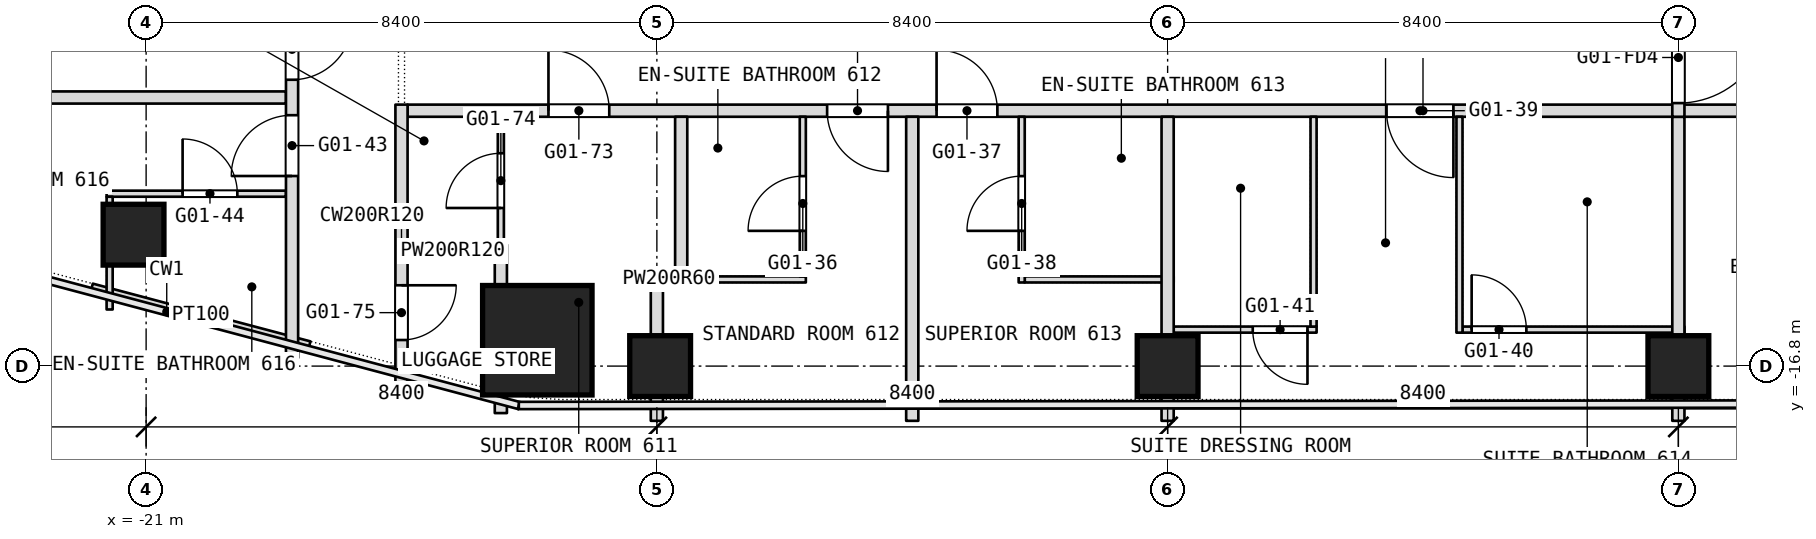
"""IFC4 building model, lengths in metres.
Left out: names, types, materials, properties, quantities, classifications, styles, units other than length and angle.
Written with IfcOpenShell. Run it as: python <this file> out.ifc"""

import sys

from ifc_helpers import new_model, si_unit, direction, frame, frame_2d, origin, origin_2d, place, context, subcontext, project, spatial, rectangle, extrude, element, fill, save


model = new_model("IFC4")
c1 = context("Model", 3, precision=1e-05, world=origin(), true_north=direction((0.0, 1.0)))
c2 = subcontext(c1, "Body", "Model", "MODEL_VIEW")
j1 = project(units=[si_unit("LENGTHUNIT", "METRE"), si_unit("PLANEANGLEUNIT", "RADIAN")], contexts=[c1])
p1 = place(None, origin())
s1 = spatial("IfcSite", under=j1, at=p1, CompositionType="ELEMENT")
p2 = place(p1, origin())
s2 = spatial("IfcBuilding", under=s1, at=p2, CompositionType="ELEMENT")
p3 = place(p2, frame((0.0, 0.0, 36.5)))
s3 = spatial("IfcBuildingStorey", under=s2, at=p3, CompositionType="ELEMENT", Elevation=36.5)
p4 = place(p3, frame((-14.566, -16.375, 0.0), z_axis=(0.0, 0.0, 1.0), x_axis=(1.0, 0.0, 0.0)))
e1 = element("IfcColumn", 1, at=p4, inside=s3, PredefinedType="COLUMN", context=c2, shape_type="SweptSolid", body=[
    extrude(rectangle(XDim=1.8, YDim=1.8, at=origin_2d()), origin(), (0.0, 0.0, 1.0), 3.6),
])
p5 = place(p3, frame((-21.207, -14.639, -0.15), z_axis=(0.0, 0.0, 1.0), x_axis=(1.0, 0.0, 0.0)))
e2 = element("IfcColumn", 2, at=p5, inside=s3, PredefinedType="COLUMN", context=c2, shape_type="SweptSolid", body=[
    extrude(rectangle(XDim=1.0, YDim=1.0, at=origin_2d()), origin(), (0.0, 0.0, 1.0), 3.75),
])
p6 = place(p3, frame((-21.89, -15.492, 0.0), z_axis=(0.0, 0.0, 1.0), x_axis=(0.966548219163, -0.256484970385, 0.0)))
e3 = element("IfcWall", 3, at=p6, inside=s3, PredefinedType="PARTITIONING", context=c2, shape_type="SweptSolid", body=[
    extrude(rectangle(XDim=3.704, YDim=0.1, at=frame_2d((1.852, 0.0))), origin(), (0.0, 0.0, 1.0), 3.34),
])
p7 = place(p3, frame((-4.1, -16.2, 0.0), z_axis=(0.0, 0.0, 1.0), x_axis=(1.0, 0.0, 0.0)))
e4 = element("IfcWall", 4, at=p7, inside=s3, PredefinedType="PARTITIONING", context=c2, shape_type="SweptSolid", body=[
    extrude(rectangle(XDim=2.35, YDim=0.1, at=frame_2d((1.175, 0.0))), origin(), (0.0, 0.0, 1.0), 2.94),
])
p8 = place(p7, frame((1.3, 0.0, 0.0)))
e5 = element("IfcOpeningElement", 5, at=p8, cuts=e4, PredefinedType="OPENING", context=c2, shape_type="SweptSolid", body=[
    extrude(rectangle(XDim=0.9, YDim=2.1, at=frame_2d((0.45, 1.05))), frame((0.0, 0.05, 0.0), z_axis=(0.0, -1.0, 0.0), x_axis=(1.0, 0.0, 0.0)), (0.0, 0.0, 1.0), 0.1),
])
p9 = place(p3, frame((0.65, -16.2, 0.0), z_axis=(0.0, 0.0, 1.0), x_axis=(1.0, 0.0, 0.0)))
e6 = element("IfcWall", 6, at=p9, inside=s3, PredefinedType="PARTITIONING", context=c2, shape_type="SweptSolid", body=[
    extrude(rectangle(XDim=3.65, YDim=0.1, at=frame_2d((1.825, 0.0))), origin(), (0.0, 0.0, 1.0), 2.94),
])
p10 = place(p9, frame((0.15, 0.0, 0.0)))
e7 = element("IfcOpeningElement", 7, at=p10, cuts=e6, PredefinedType="OPENING", context=c2, shape_type="SweptSolid", body=[
    extrude(rectangle(XDim=0.9, YDim=2.1, at=frame_2d((0.45, 1.05))), frame((0.0, 0.05, 0.0), z_axis=(0.0, -1.0, 0.0), x_axis=(1.0, 0.0, 0.0)), (0.0, 0.0, 1.0), 0.1),
])
p11 = place(p3, frame((-12.7, -15.375, 0.0), z_axis=(0.0, 0.0, 1.0), x_axis=(1.0, 0.0, 0.0)))
e8 = element("IfcWall", 8, at=p11, inside=s3, PredefinedType="PARTITIONING", context=c2, shape_type="SweptSolid", body=[
    extrude(rectangle(XDim=0.6, YDim=0.2, at=frame_2d((0.3, 0.0))), origin(), (0.0, 0.0, 1.0), 3.34),
])
p12 = place(p3, frame((-12.1, -15.375, 0.0), z_axis=(0.0, 0.0, 1.0), x_axis=(1.0, 0.0, 0.0)))
e9 = element("IfcWall", 9, at=p12, inside=s3, PredefinedType="PARTITIONING", context=c2, shape_type="SweptSolid", body=[
    extrude(rectangle(XDim=1.95, YDim=0.1, at=frame_2d((0.975, 0.0))), origin(), (0.0, 0.0, 1.0), 3.34),
])
p13 = place(p3, frame((-6.55, -15.375, 0.0), z_axis=(0.0, 0.0, 1.0), x_axis=(1.0, 0.0, 0.0)))
e10 = element("IfcWall", 10, at=p13, inside=s3, PredefinedType="PARTITIONING", context=c2, shape_type="SweptSolid", body=[
    extrude(rectangle(XDim=2.45, YDim=0.1, at=frame_2d((1.225, 0.0))), origin(), (0.0, 0.0, 1.0), 3.34),
])
p14 = place(p3, frame((-16.7, -14.9, 0.0), z_axis=(0.0, 0.0, 1.0), x_axis=(1.0, 0.0, 0.0)))
e11 = element("IfcWall", 11, at=p14, inside=s3, PredefinedType="PARTITIONING", context=c2, shape_type="SweptSolid", body=[
    extrude(rectangle(XDim=1.484, YDim=0.2, at=frame_2d((0.742, 0.0))), origin(), (0.0, 0.0, 1.0), 3.34),
])
p15 = place(p3, frame((-21.65, -13.965, 0.0), z_axis=(0.0, 0.0, 1.0), x_axis=(1.0, 0.0, 0.0)))
e12 = element("IfcWall", 12, at=p15, inside=s3, PredefinedType="PARTITIONING", context=c2, shape_type="SweptSolid", body=[
    extrude(rectangle(XDim=2.95, YDim=0.1, at=frame_2d((1.475, 0.0))), origin(), (0.0, 0.0, 1.0), 3.34),
])
p16 = place(p15, frame((1.25, 0.0, 0.0)))
e13 = element("IfcOpeningElement", 13, at=p16, cuts=e12, PredefinedType="OPENING", context=c2, shape_type="SweptSolid", body=[
    extrude(rectangle(XDim=0.9, YDim=2.1, at=frame_2d((0.45, 1.05))), frame((0.0, 0.05, 0.0), z_axis=(0.0, -1.0, 0.0), x_axis=(1.0, 0.0, 0.0)), (0.0, 0.0, 1.0), 0.1),
])
p17 = place(p3, frame((-16.7, -12.6, 0.0), z_axis=(0.0, 0.0, 1.0), x_axis=(1.0, 0.0, 0.0)))
e14 = element("IfcWall", 14, at=p17, inside=s3, PredefinedType="PARTITIONING", context=c2, shape_type="SweptSolid", body=[
    extrude(rectangle(XDim=33.4, YDim=0.2, at=frame_2d((16.7, 0.0))), origin(), (0.0, 0.0, 1.0), 3.34),
])
p18 = place(p17, frame((6.9, 0.0, 0.0)))
e15 = element("IfcOpeningElement", 15, at=p18, cuts=e14, PredefinedType="OPENING", context=c2, shape_type="SweptSolid", body=[
    extrude(rectangle(XDim=1.0, YDim=2.1, at=frame_2d((0.5, 1.05))), frame((0.0, 0.1, 0.0), z_axis=(0.0, -1.0, 0.0), x_axis=(1.0, 0.0, 0.0)), (0.0, 0.0, 1.0), 0.2),
])
p19 = place(p17, frame((8.7, 0.0, 0.0)))
e16 = element("IfcOpeningElement", 16, at=p19, cuts=e14, PredefinedType="OPENING", context=c2, shape_type="SweptSolid", body=[
    extrude(rectangle(XDim=1.0, YDim=2.1, at=frame_2d((0.5, 1.05))), frame((0.0, 0.1, 0.0), z_axis=(0.0, -1.0, 0.0), x_axis=(1.0, 0.0, 0.0)), (0.0, 0.0, 1.0), 0.2),
])
p20 = place(p17, frame((16.1, 0.0, 0.0)))
e17 = element("IfcOpeningElement", 17, at=p20, cuts=e14, PredefinedType="OPENING", context=c2, shape_type="SweptSolid", body=[
    extrude(rectangle(XDim=1.1, YDim=2.1, at=frame_2d((0.55, 1.05))), frame((0.0, 0.1, 0.0), z_axis=(0.0, -1.0, 0.0), x_axis=(1.0, 0.0, 0.0)), (0.0, 0.0, 1.0), 0.2),
])
p21 = place(p17, frame((24.2, 0.0, 0.0)))
e18 = element("IfcOpeningElement", 18, at=p21, cuts=e14, PredefinedType="OPENING", context=c2, shape_type="SweptSolid", body=[
    extrude(rectangle(XDim=1.8, YDim=2.1, at=frame_2d((0.9, 1.05))), frame((0.0, 0.1, 0.0), z_axis=(0.0, -1.0, 0.0), x_axis=(1.0, 0.0, 0.0)), (0.0, 0.0, 1.0), 0.2),
])
p22 = place(p17, frame((2.317, 0.0, 0.0)))
e19 = element("IfcOpeningElement", 19, at=p22, cuts=e14, PredefinedType="OPENING", context=c2, shape_type="SweptSolid", body=[
    extrude(rectangle(XDim=1.0, YDim=2.1, at=frame_2d((0.5, 1.05))), frame((0.0, 0.1, 0.0), z_axis=(0.0, -1.0, 0.0), x_axis=(1.0, 0.0, 0.0)), (0.0, 0.0, 1.0), 0.2),
])
p23 = place(p17, frame((30.033, 0.0, 0.0)))
e20 = element("IfcOpeningElement", 20, at=p23, cuts=e14, PredefinedType="OPENING", context=c2, shape_type="SweptSolid", body=[
    extrude(rectangle(XDim=1.0, YDim=2.1, at=frame_2d((0.5, 1.05))), frame((0.0, 0.1, 0.0), z_axis=(0.0, -1.0, 0.0), x_axis=(1.0, 0.0, 0.0)), (0.0, 0.0, 1.0), 0.2),
])
p24 = place(p3, frame((-26.463, -12.383, 0.0), z_axis=(0.0, 0.0, 1.0), x_axis=(1.0, 0.0, 0.0)))
e21 = element("IfcWall", 21, at=p24, inside=s3, PredefinedType="PARTITIONING", context=c2, shape_type="SweptSolid", body=[
    extrude(rectangle(XDim=7.763, YDim=0.2, at=frame_2d((3.881, 0.0))), origin(), (0.0, 0.0, 1.0), 3.34),
])
p25 = place(p3, frame((4.2, -17.7, 0.0), z_axis=(0.0, 0.0, 1.0), x_axis=(0.0, 1.0, 0.0)))
e22 = element("IfcWall", 22, at=p25, inside=s3, PredefinedType="PARTITIONING", context=c2, shape_type="SweptSolid", body=[
    extrude(rectangle(XDim=5.0, YDim=0.2, at=frame_2d((2.5, 0.0))), origin(), (0.0, 0.0, 1.0), 3.34),
])
p26 = place(p3, frame((4.2, -12.7, 0.0), z_axis=(0.0, 0.0, 1.0), x_axis=(0.0, 1.0, 0.0)))
e23 = element("IfcWall", 23, at=p26, inside=s3, PredefinedType="PARTITIONING", context=c2, shape_type="SweptSolid", body=[
    extrude(rectangle(XDim=12.7, YDim=0.2, at=frame_2d((6.35, 0.0))), origin(), (0.0, 0.0, 1.0), 3.34),
])
p27 = place(p26, frame((11.05, 0.0, 0.0)))
e24 = element("IfcOpeningElement", 24, at=p27, cuts=e23, PredefinedType="OPENING", context=c2, shape_type="SweptSolid", body=[
    extrude(rectangle(XDim=1.5, YDim=2.1, at=frame_2d((0.75, 1.05))), frame((0.0, 0.1, 0.0), z_axis=(0.0, -1.0, 0.0), x_axis=(1.0, 0.0, 0.0)), (0.0, 0.0, 1.0), 0.2),
])
p28 = place(p26, frame((0.225, 0.0, 0.0)))
e25 = element("IfcOpeningElement", 25, at=p28, cuts=e23, PredefinedType="OPENING", context=c2, shape_type="SweptSolid", body=[
    extrude(rectangle(XDim=1.5, YDim=2.1, at=frame_2d((0.75, 1.05))), frame((0.0, 0.1, 0.0), z_axis=(0.0, -1.0, 0.0), x_axis=(1.0, 0.0, 0.0)), (0.0, 0.0, 1.0), 0.2),
])
p29 = place(p3, frame((0.6, -16.25, 0.0), z_axis=(0.0, 0.0, 1.0), x_axis=(0.0, 1.0, 0.0)))
e26 = element("IfcWall", 26, at=p29, inside=s3, PredefinedType="PARTITIONING", context=c2, shape_type="SweptSolid", body=[
    extrude(rectangle(XDim=3.55, YDim=0.1, at=frame_2d((1.775, 0.0))), origin(), (0.0, 0.0, 1.0), 3.34),
])
p30 = place(p3, frame((-1.8, -16.15, 0.0), z_axis=(0.0, 0.0, 1.0), x_axis=(0.0, 1.0, 0.0)))
e27 = element("IfcWall", 27, at=p30, inside=s3, PredefinedType="PARTITIONING", context=c2, shape_type="SweptSolid", body=[
    extrude(rectangle(XDim=3.45, YDim=0.1, at=frame_2d((1.725, 0.0))), origin(), (0.0, 0.0, 1.0), 3.34),
])
p31 = place(p3, frame((-4.2, -17.7, 0.0), z_axis=(0.0, 0.0, 1.0), x_axis=(0.0, 1.0, 0.0)))
e28 = element("IfcWall", 28, at=p31, inside=s3, PredefinedType="PARTITIONING", context=c2, shape_type="SweptSolid", body=[
    extrude(rectangle(XDim=5.0, YDim=0.2, at=frame_2d((2.5, 0.0))), origin(), (0.0, 0.0, 1.0), 3.34),
])
p32 = place(p3, frame((-6.6, -15.425, 0.0), z_axis=(0.0, 0.0, 1.0), x_axis=(0.0, 1.0, 0.0)))
e29 = element("IfcWall", 29, at=p32, inside=s3, PredefinedType="PARTITIONING", context=c2, shape_type="SweptSolid", body=[
    extrude(rectangle(XDim=2.725, YDim=0.1, at=frame_2d((1.363, 0.0))), origin(), (0.0, 0.0, 1.0), 3.34),
])
p33 = place(p32, frame((0.849, 0.0, 0.0)))
e30 = element("IfcOpeningElement", 30, at=p33, cuts=e29, PredefinedType="OPENING", context=c2, shape_type="SweptSolid", body=[
    extrude(rectangle(XDim=0.9, YDim=2.1, at=frame_2d((0.45, 1.05))), frame((0.0, 0.05, 0.0), z_axis=(0.0, -1.0, 0.0), x_axis=(1.0, 0.0, 0.0)), (0.0, 0.0, 1.0), 0.1),
])
p34 = place(p3, frame((-8.4, -17.7, 0.0), z_axis=(0.0, 0.0, 1.0), x_axis=(0.0, 1.0, 0.0)))
e31 = element("IfcWall", 31, at=p34, inside=s3, PredefinedType="PARTITIONING", context=c2, shape_type="SweptSolid", body=[
    extrude(rectangle(XDim=5.0, YDim=0.2, at=frame_2d((2.5, 0.0))), origin(), (0.0, 0.0, 1.0), 3.34),
])
p35 = place(p3, frame((-10.2, -15.325, 0.0), z_axis=(0.0, 0.0, 1.0), x_axis=(0.0, 1.0, 0.0)))
e32 = element("IfcWall", 32, at=p35, inside=s3, PredefinedType="PARTITIONING", context=c2, shape_type="SweptSolid", body=[
    extrude(rectangle(XDim=2.625, YDim=0.1, at=frame_2d((1.312, 0.0))), origin(), (0.0, 0.0, 1.0), 3.34),
])
p36 = place(p35, frame((0.749, 0.0, 0.0)))
e33 = element("IfcOpeningElement", 33, at=p36, cuts=e32, PredefinedType="OPENING", context=c2, shape_type="SweptSolid", body=[
    extrude(rectangle(XDim=0.9, YDim=2.1, at=frame_2d((0.45, 1.05))), frame((0.0, 0.05, 0.0), z_axis=(0.0, -1.0, 0.0), x_axis=(1.0, 0.0, 0.0)), (0.0, 0.0, 1.0), 0.1),
])
p37 = place(p3, frame((-12.2, -15.275, 0.0), z_axis=(0.0, 0.0, 1.0), x_axis=(0.0, 1.0, 0.0)))
e34 = element("IfcWall", 34, at=p37, inside=s3, PredefinedType="PARTITIONING", context=c2, shape_type="SweptSolid", body=[
    extrude(rectangle(XDim=2.575, YDim=0.2, at=frame_2d((1.288, 0.0))), origin(), (0.0, 0.0, 1.0), 3.34),
])
p38 = place(p3, frame((-12.6, -17.7, 0.0), z_axis=(0.0, 0.0, 1.0), x_axis=(0.0, 1.0, 0.0)))
e35 = element("IfcWall", 35, at=p38, inside=s3, PredefinedType="PARTITIONING", context=c2, shape_type="SweptSolid", body=[
    extrude(rectangle(XDim=2.225, YDim=0.2, at=frame_2d((1.112, 0.0))), origin(), (0.0, 0.0, 1.0), 3.34),
])
p39 = place(p3, frame((-15.166, -17.573, 0.0), z_axis=(0.0, 0.0, 1.0), x_axis=(0.0, 1.0, 0.0)))
e36 = element("IfcWall", 36, at=p39, inside=s3, PredefinedType="PARTITIONING", context=c2, shape_type="SweptSolid", body=[
    extrude(rectangle(XDim=0.298, YDim=0.2, at=frame_2d((0.149, 0.0))), origin(), (0.0, 0.0, 1.0), 3.34),
])
p40 = place(p3, frame((-15.166, -15.475, 0.0), z_axis=(0.0, 0.0, 1.0), x_axis=(0.0, 1.0, 0.0)))
e37 = element("IfcWall", 37, at=p40, inside=s3, PredefinedType="PARTITIONING", context=c2, shape_type="SweptSolid", body=[
    extrude(rectangle(XDim=0.675, YDim=0.2, at=frame_2d((0.337, 0.0))), origin(), (0.0, 0.0, 1.0), 3.34),
])
p41 = place(p3, frame((-15.166, -15.0, 0.0), z_axis=(0.0, 0.0, 1.0), x_axis=(0.0, 1.0, 0.0)))
e38 = element("IfcWall", 38, at=p41, inside=s3, PredefinedType="PARTITIONING", context=c2, shape_type="SweptSolid", body=[
    extrude(rectangle(XDim=2.3, YDim=0.1, at=frame_2d((1.15, 0.0))), origin(), (0.0, 0.0, 1.0), 3.34),
])
p42 = place(p41, frame((0.8, 0.0, 0.0)))
e39 = element("IfcOpeningElement", 39, at=p42, cuts=e38, PredefinedType="OPENING", context=c2, shape_type="SweptSolid", body=[
    extrude(rectangle(XDim=0.9, YDim=2.1, at=frame_2d((0.45, 1.05))), frame((0.0, 0.05, 0.0), z_axis=(0.0, -1.0, 0.0), x_axis=(1.0, 0.0, 0.0)), (0.0, 0.0, 1.0), 0.1),
])
p43 = place(p3, frame((-16.8, -17.143, 0.0), z_axis=(0.0, 0.0, 1.0), x_axis=(0.0, 1.0, 0.0)))
e40 = element("IfcWall", 40, at=p43, inside=s3, PredefinedType="PARTITIONING", context=c2, shape_type="SweptSolid", body=[
    extrude(rectangle(XDim=4.643, YDim=0.2, at=frame_2d((2.322, 0.0))), origin(), (0.0, 0.0, 1.0), 3.34),
])
p44 = place(p43, frame((0.772, 0.0, 0.0)))
e41 = element("IfcOpeningElement", 41, at=p44, cuts=e40, PredefinedType="OPENING", context=c2, shape_type="SweptSolid", body=[
    extrude(rectangle(XDim=0.9, YDim=2.1, at=frame_2d((0.45, 1.05))), frame((0.0, 0.1, 0.0), z_axis=(0.0, -1.0, 0.0), x_axis=(1.0, 0.0, 0.0)), (0.0, 0.0, 1.0), 0.2),
])
p45 = place(p3, frame((-18.6, -16.665, 0.0), z_axis=(0.0, 0.0, 1.0), x_axis=(0.0, 1.0, 0.0)))
e42 = element("IfcWall", 42, at=p45, inside=s3, PredefinedType="PARTITIONING", context=c2, shape_type="SweptSolid", body=[
    extrude(rectangle(XDim=23.565, YDim=0.2, at=frame_2d((11.782, 0.0))), origin(), (0.0, 0.0, 1.0), 3.34),
])
p46 = place(p45, frame((2.991, 0.0, 0.0)))
e43 = element("IfcOpeningElement", 43, at=p46, cuts=e42, PredefinedType="OPENING", context=c2, shape_type="SweptSolid", body=[
    extrude(rectangle(XDim=1.0, YDim=2.1, at=frame_2d((0.5, 1.05))), frame((0.0, 0.1, 0.0), z_axis=(0.0, -1.0, 0.0), x_axis=(1.0, 0.0, 0.0)), (0.0, 0.0, 1.0), 0.2),
])
p47 = place(p45, frame((4.574, 0.0, 0.0)))
e44 = element("IfcOpeningElement", 44, at=p47, cuts=e42, PredefinedType="OPENING", context=c2, shape_type="SweptSolid", body=[
    extrude(rectangle(XDim=1.0, YDim=2.1, at=frame_2d((0.5, 1.05))), frame((0.0, 0.1, 0.0), z_axis=(0.0, -1.0, 0.0), x_axis=(1.0, 0.0, 0.0)), (0.0, 0.0, 1.0), 0.2),
])
p48 = place(p45, frame((11.565, 0.0, 0.0)))
e45 = element("IfcOpeningElement", 45, at=p48, cuts=e42, PredefinedType="OPENING", context=c2, shape_type="SweptSolid", body=[
    extrude(rectangle(XDim=1.8, YDim=2.1, at=frame_2d((0.9, 1.05))), frame((0.0, 0.1, 0.0), z_axis=(0.0, -1.0, 0.0), x_axis=(1.0, 0.0, 0.0)), (0.0, 0.0, 1.0), 0.2),
])
p49 = place(p3, frame((-21.6, -15.869, 0.0), z_axis=(0.0, 0.0, 1.0), x_axis=(0.0, 1.0, 0.0)))
e46 = element("IfcWall", 46, at=p49, inside=s3, PredefinedType="PARTITIONING", context=c2, shape_type="SweptSolid", body=[
    extrude(rectangle(XDim=1.854, YDim=0.1, at=frame_2d((0.927, 0.0))), origin(), (0.0, 0.0, 1.0), 3.34),
])
p50 = place(p8, origin())
e47 = element("IfcDoor", 47, at=p50, inside=s3, OperationType="SINGLE_SWING_RIGHT", PredefinedType="DOOR", context=c2, shape_type="SweptSolid", body=[
    extrude(rectangle(XDim=0.9, YDim=2.1, at=frame_2d((0.45, 1.05))), frame((0.0, 0.025, 0.0), z_axis=(0.0, -1.0, 0.0), x_axis=(1.0, 0.0, 0.0)), (0.0, 0.0, 1.0), 0.05),
])
fill(e5, e47)
p51 = place(p10, origin())
e48 = element("IfcDoor", 48, at=p51, inside=s3, OperationType="SINGLE_SWING_LEFT", PredefinedType="DOOR", context=c2, shape_type="SweptSolid", body=[
    extrude(rectangle(XDim=0.9, YDim=2.1, at=frame_2d((0.45, 1.05))), frame((0.0, 0.025, 0.0), z_axis=(0.0, -1.0, 0.0), x_axis=(1.0, 0.0, 0.0)), (0.0, 0.0, 1.0), 0.05),
])
fill(e7, e48)
p52 = place(p16, origin())
e49 = element("IfcDoor", 49, at=p52, inside=s3, OperationType="SINGLE_SWING_RIGHT", PredefinedType="DOOR", context=c2, shape_type="SweptSolid", body=[
    extrude(rectangle(XDim=0.9, YDim=2.1, at=frame_2d((0.45, 1.05))), frame((0.0, 0.025, 0.0), z_axis=(0.0, -1.0, 0.0), x_axis=(1.0, 0.0, 0.0)), (0.0, 0.0, 1.0), 0.05),
])
fill(e13, e49)
p53 = place(p18, origin())
e50 = element("IfcDoor", 50, at=p53, inside=s3, OperationType="SINGLE_SWING_LEFT", PredefinedType="DOOR", context=c2, shape_type="SweptSolid", body=[
    extrude(rectangle(XDim=1.0, YDim=2.1, at=frame_2d((0.5, 1.05))), frame((0.0, 0.025, 0.0), z_axis=(0.0, -1.0, 0.0), x_axis=(1.0, 0.0, 0.0)), (0.0, 0.0, 1.0), 0.05),
])
fill(e15, e50)
p54 = place(p19, origin())
e51 = element("IfcDoor", 51, at=p54, inside=s3, OperationType="SINGLE_SWING_LEFT", PredefinedType="DOOR", context=c2, shape_type="SweptSolid", body=[
    extrude(rectangle(XDim=1.0, YDim=2.1, at=frame_2d((0.5, 1.05))), frame((0.0, 0.025, 0.0), z_axis=(0.0, -1.0, 0.0), x_axis=(1.0, 0.0, 0.0)), (0.0, 0.0, 1.0), 0.05),
])
fill(e16, e51)
p55 = place(p20, origin())
e52 = element("IfcDoor", 52, at=p55, inside=s3, OperationType="SINGLE_SWING_LEFT", PredefinedType="DOOR", context=c2, shape_type="SweptSolid", body=[
    extrude(rectangle(XDim=1.1, YDim=2.1, at=frame_2d((0.55, 1.05))), frame((0.0, 0.025, 0.0), z_axis=(0.0, -1.0, 0.0), x_axis=(1.0, 0.0, 0.0)), (0.0, 0.0, 1.0), 0.05),
])
fill(e17, e52)
p56 = place(p22, origin())
e53 = element("IfcDoor", 53, at=p56, inside=s3, OperationType="SINGLE_SWING_RIGHT", PredefinedType="DOOR", context=c2, shape_type="SweptSolid", body=[
    extrude(rectangle(XDim=1.0, YDim=2.1, at=frame_2d((0.5, 1.05))), frame((0.0, 0.025, 0.0), z_axis=(0.0, -1.0, 0.0), x_axis=(1.0, 0.0, 0.0)), (0.0, 0.0, 1.0), 0.05),
])
fill(e19, e53)
p57 = place(p33, origin())
e54 = element("IfcDoor", 54, at=p57, inside=s3, OperationType="SINGLE_SWING_RIGHT", PredefinedType="DOOR", context=c2, shape_type="SweptSolid", body=[
    extrude(rectangle(XDim=0.9, YDim=2.1, at=frame_2d((0.45, 1.05))), frame((0.0, 0.025, 0.0), z_axis=(0.0, -1.0, 0.0), x_axis=(1.0, 0.0, 0.0)), (0.0, 0.0, 1.0), 0.05),
])
fill(e30, e54)
p58 = place(p36, origin())
e55 = element("IfcDoor", 55, at=p58, inside=s3, OperationType="SINGLE_SWING_LEFT", PredefinedType="DOOR", context=c2, shape_type="SweptSolid", body=[
    extrude(rectangle(XDim=0.9, YDim=2.1, at=frame_2d((0.45, 1.05))), frame((0.0, 0.025, 0.0), z_axis=(0.0, -1.0, 0.0), x_axis=(1.0, 0.0, 0.0)), (0.0, 0.0, 1.0), 0.05),
])
fill(e33, e55)
p59 = place(p42, origin())
e56 = element("IfcDoor", 56, at=p59, inside=s3, OperationType="SINGLE_SWING_LEFT", PredefinedType="DOOR", context=c2, shape_type="SweptSolid", body=[
    extrude(rectangle(XDim=0.9, YDim=2.1, at=frame_2d((0.45, 1.05))), frame((0.0, 0.025, 0.0), z_axis=(0.0, -1.0, 0.0), x_axis=(1.0, 0.0, 0.0)), (0.0, 0.0, 1.0), 0.05),
])
fill(e39, e56)
p60 = place(p44, origin())
e57 = element("IfcDoor", 57, at=p60, inside=s3, OperationType="SINGLE_SWING_LEFT", PredefinedType="DOOR", context=c2, shape_type="SweptSolid", body=[
    extrude(rectangle(XDim=0.9, YDim=2.1, at=frame_2d((0.45, 1.05))), frame((0.0, 0.025, 0.0), z_axis=(0.0, -1.0, 0.0), x_axis=(1.0, 0.0, 0.0)), (0.0, 0.0, 1.0), 0.05),
])
fill(e41, e57)
p61 = place(p46, origin())
e58 = element("IfcDoor", 58, at=p61, inside=s3, OperationType="SINGLE_SWING_RIGHT", PredefinedType="DOOR", context=c2, shape_type="SweptSolid", body=[
    extrude(rectangle(XDim=1.0, YDim=2.1, at=frame_2d((0.5, 1.05))), frame((0.0, 0.025, 0.0), z_axis=(0.0, -1.0, 0.0), x_axis=(1.0, 0.0, 0.0)), (0.0, 0.0, 1.0), 0.05),
])
fill(e43, e58)
p62 = place(p47, origin())
e59 = element("IfcDoor", 59, at=p62, inside=s3, OperationType="SINGLE_SWING_RIGHT", PredefinedType="DOOR", context=c2, shape_type="SweptSolid", body=[
    extrude(rectangle(XDim=1.0, YDim=2.1, at=frame_2d((0.5, 1.05))), frame((0.0, 0.025, 0.0), z_axis=(0.0, -1.0, 0.0), x_axis=(1.0, 0.0, 0.0)), (0.0, 0.0, 1.0), 0.05),
])
fill(e44, e59)
p63 = place(p28, origin())
e60 = element("IfcDoor", 60, at=p63, inside=s3, OperationType="DOUBLE_DOOR_DOUBLE_SWING", PredefinedType="DOOR", context=c2, shape_type="SweptSolid", body=[
    extrude(rectangle(XDim=1.5, YDim=2.1, at=frame_2d((0.75, 1.05))), frame((0.0, 0.025, 0.0), z_axis=(0.0, -1.0, 0.0), x_axis=(1.0, 0.0, 0.0)), (0.0, 0.0, 1.0), 0.05),
])
fill(e25, e60)
save(model, sys.argv[1])
